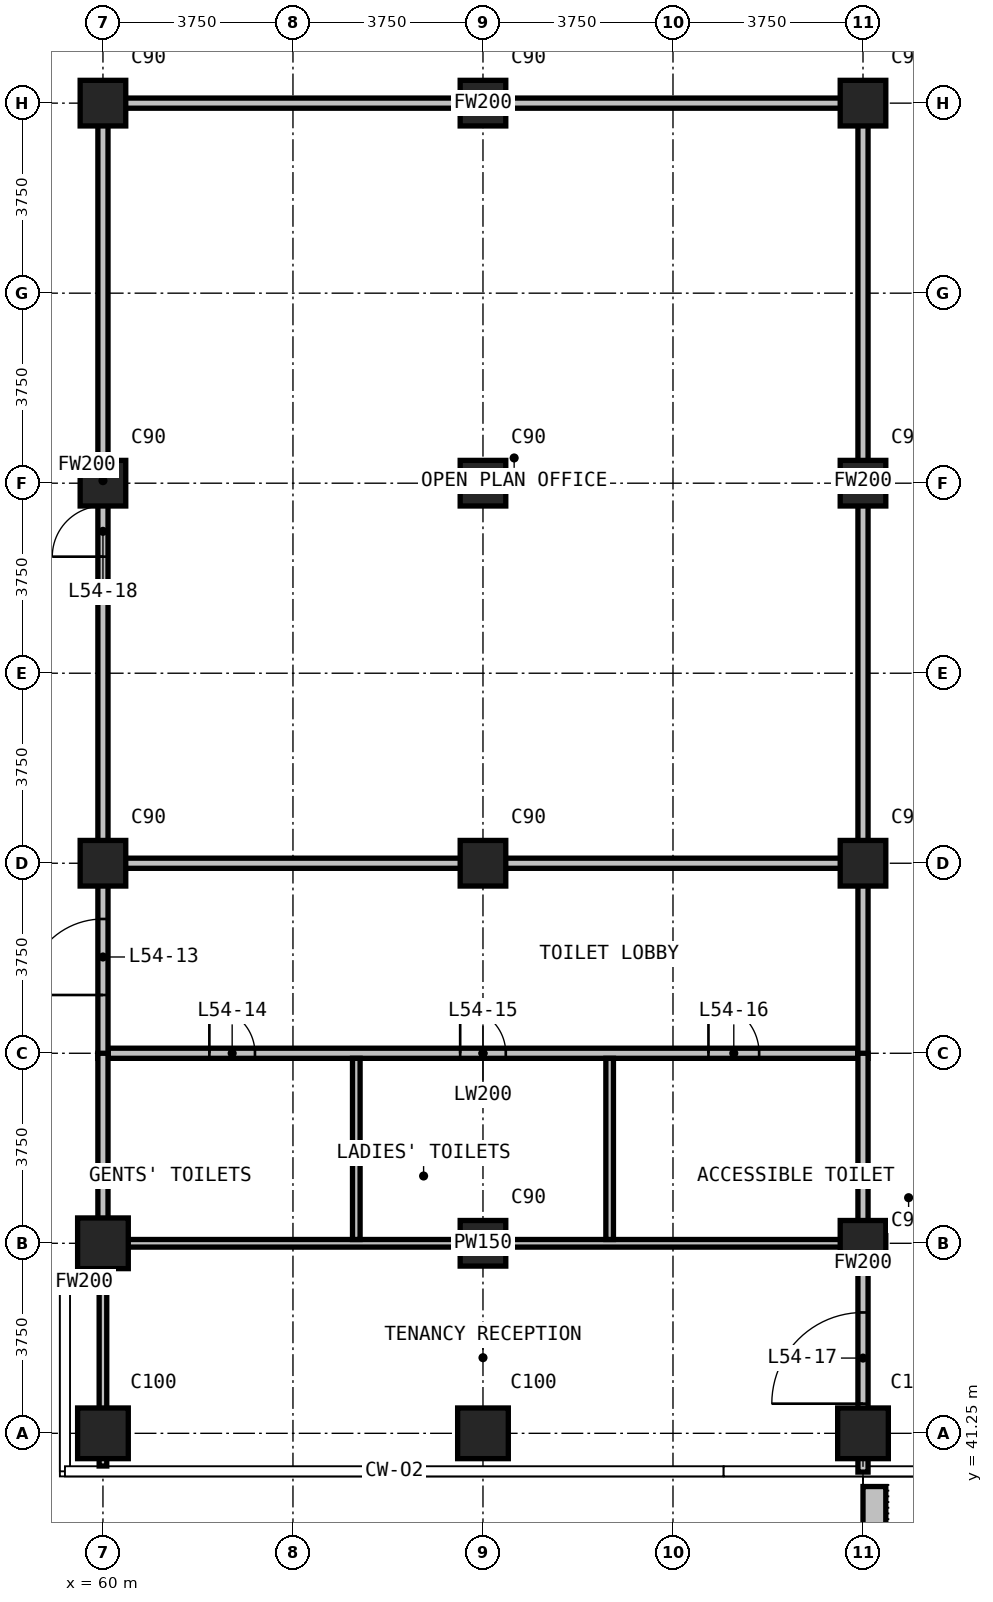
"""IFC4 building model, lengths in metres.
Left out: names, types, materials, properties, quantities, classifications, styles, units other than length and angle.
Written with IfcOpenShell. Run it as: python <this file> out.ifc"""

import sys

from ifc_helpers import new_model, si_unit, direction, frame, frame_2d, origin, origin_2d, place, context, subcontext, project, spatial, rectangle, extrude, element, fill, save


model = new_model("IFC4")
c1 = context("Model", 3, precision=1e-05, world=origin(), true_north=direction((0.0, 1.0)))
c2 = subcontext(c1, "Body", "Model", "MODEL_VIEW")
j1 = project(units=[si_unit("LENGTHUNIT", "METRE"), si_unit("PLANEANGLEUNIT", "RADIAN")], contexts=[c1])
p1 = place(None, origin())
s1 = spatial("IfcSite", under=j1, at=p1, CompositionType="ELEMENT")
p2 = place(p1, origin())
s2 = spatial("IfcBuilding", under=s1, at=p2, CompositionType="ELEMENT")
p3 = place(p2, frame((0.0, 0.0, 210.3)))
s3 = spatial("IfcBuildingStorey", under=s2, at=p3, CompositionType="ELEMENT", Elevation=210.3)
for number, where, z_axis, x_axis in (
    (1, (60.0, 41.25, 0.0), (0.0, 0.0, 1.0), (1.0, 0.0, 0.0)),
    (2, (60.0, 45.0, 0.0), (0.0, 0.0, 1.0), (1.0, 0.0, 0.0)),
):
    element("IfcColumn", number, at=place(p3, frame(where, z_axis=z_axis, x_axis=x_axis)), inside=s3, PredefinedType="COLUMN", context=c2, shape_type="SweptSolid", body=[
        extrude(rectangle(XDim=1.0, YDim=1.0, at=origin_2d()), origin(), (0.0, 0.0, 1.0), 3.6),
    ])
for number, where, z_axis, x_axis in (
    (3, (60.0, 52.5, 0.0), (0.0, 0.0, 1.0), (1.0, 0.0, 0.0)),
    (4, (60.0, 60.0, 0.0), (0.0, 0.0, 1.0), (1.0, 0.0, 0.0)),
    (5, (60.0, 67.5, 0.0), (0.0, 0.0, 1.0), (1.0, 0.0, 0.0)),
):
    element("IfcColumn", number, at=place(p3, frame(where, z_axis=z_axis, x_axis=x_axis)), inside=s3, PredefinedType="COLUMN", context=c2, shape_type="SweptSolid", body=[
        extrude(rectangle(XDim=0.9, YDim=0.9, at=origin_2d()), origin(), (0.0, 0.0, 1.0), 3.6),
    ])
p4 = place(p3, frame((67.5, 41.25, 0.0), z_axis=(0.0, 0.0, 1.0), x_axis=(1.0, 0.0, 0.0)))
e6 = element("IfcColumn", 6, at=p4, inside=s3, PredefinedType="COLUMN", context=c2, shape_type="SweptSolid", body=[
    extrude(rectangle(XDim=1.0, YDim=1.0, at=origin_2d()), origin(), (0.0, 0.0, 1.0), 3.6),
])
for number, where, z_axis, x_axis in (
    (7, (67.5, 45.0, 0.0), (0.0, 0.0, 1.0), (1.0, 0.0, 0.0)),
    (8, (67.5, 52.5, 0.0), (0.0, 0.0, 1.0), (1.0, 0.0, 0.0)),
    (9, (67.5, 60.0, 0.0), (0.0, 0.0, 1.0), (1.0, 0.0, 0.0)),
    (10, (67.5, 67.5, 0.0), (0.0, 0.0, 1.0), (1.0, 0.0, 0.0)),
):
    element("IfcColumn", number, at=place(p3, frame(where, z_axis=z_axis, x_axis=x_axis)), inside=s3, PredefinedType="COLUMN", context=c2, shape_type="SweptSolid", body=[
        extrude(rectangle(XDim=0.9, YDim=0.9, at=origin_2d()), origin(), (0.0, 0.0, 1.0), 3.6),
    ])
p5 = place(p3, frame((75.0, 41.25, 0.0), z_axis=(0.0, 0.0, 1.0), x_axis=(1.0, 0.0, 0.0)))
e11 = element("IfcColumn", 11, at=p5, inside=s3, PredefinedType="COLUMN", context=c2, shape_type="SweptSolid", body=[
    extrude(rectangle(XDim=1.0, YDim=1.0, at=origin_2d()), origin(), (0.0, 0.0, 1.0), 3.6),
])
for number, where, z_axis, x_axis in (
    (12, (75.0, 45.0, 0.0), (0.0, 0.0, 1.0), (1.0, 0.0, 0.0)),
    (13, (75.0, 52.5, 0.0), (0.0, 0.0, 1.0), (1.0, 0.0, 0.0)),
    (14, (75.0, 60.0, 0.0), (0.0, 0.0, 1.0), (1.0, 0.0, 0.0)),
    (15, (75.0, 67.5, 0.0), (0.0, 0.0, 1.0), (1.0, 0.0, 0.0)),
):
    element("IfcColumn", number, at=place(p3, frame(where, z_axis=z_axis, x_axis=x_axis)), inside=s3, PredefinedType="COLUMN", context=c2, shape_type="SweptSolid", body=[
        extrude(rectangle(XDim=0.9, YDim=0.9, at=origin_2d()), origin(), (0.0, 0.0, 1.0), 3.6),
    ])
p6 = place(p3, frame((75.225, 40.2, 0.0), z_axis=(0.0, 0.0, 1.0), x_axis=(0.0, -1.0, 0.0)))
e16 = element("IfcWall", 16, at=p6, inside=s3, PredefinedType="USERDEFINED", context=c2, shape_type="SweptSolid", body=[
    extrude(rectangle(XDim=2.35, YDim=0.45, at=frame_2d((1.175, 0.0))), origin(), (0.0, 0.0, 1.0), 1.1),
])
p7 = place(p3, frame((60.1, 48.75, 0.0), z_axis=(0.0, 0.0, 1.0), x_axis=(1.0, 0.0, 0.0)))
e17 = element("IfcWall", 17, at=p7, inside=s3, PredefinedType="PARTITIONING", context=c2, shape_type="SweptSolid", body=[
    extrude(rectangle(XDim=14.8, YDim=0.2, at=frame_2d((7.4, 0.0))), origin(), (0.0, 0.0, 1.0), 3.3),
])
p8 = place(p7, frame((2.0, 0.0, 0.0)))
e18 = element("IfcOpeningElement", 18, at=p8, cuts=e17, PredefinedType="OPENING", context=c2, shape_type="SweptSolid", body=[
    extrude(rectangle(XDim=0.9, YDim=2.2, at=frame_2d((0.45, 1.1))), frame((0.0, 0.11, 0.0), z_axis=(0.0, -1.0, 0.0), x_axis=(1.0, 0.0, 0.0)), (0.0, 0.0, 1.0), 0.22),
])
p9 = place(p7, frame((6.95, 0.0, 0.0)))
e19 = element("IfcOpeningElement", 19, at=p9, cuts=e17, PredefinedType="OPENING", context=c2, shape_type="SweptSolid", body=[
    extrude(rectangle(XDim=0.9, YDim=2.2, at=frame_2d((0.45, 1.1))), frame((0.0, 0.11, 0.0), z_axis=(0.0, -1.0, 0.0), x_axis=(1.0, 0.0, 0.0)), (0.0, 0.0, 1.0), 0.22),
])
p10 = place(p7, frame((11.85, 0.0, 0.0)))
e20 = element("IfcOpeningElement", 20, at=p10, cuts=e17, PredefinedType="OPENING", context=c2, shape_type="SweptSolid", body=[
    extrude(rectangle(XDim=1.0, YDim=2.2, at=frame_2d((0.5, 1.1))), frame((0.0, 0.11, 0.0), z_axis=(0.0, -1.0, 0.0), x_axis=(1.0, 0.0, 0.0)), (0.0, 0.0, 1.0), 0.22),
])
p11 = place(p3, frame((60.1, 52.5, 0.0), z_axis=(0.0, 0.0, 1.0), x_axis=(1.0, 0.0, 0.0)))
e21 = element("IfcWall", 21, at=p11, inside=s3, PredefinedType="PARTITIONING", context=c2, shape_type="SweptSolid", body=[
    extrude(rectangle(XDim=14.8, YDim=0.2, at=frame_2d((7.4, 0.0))), origin(), (0.0, 0.0, 1.0), 3.3),
])
p12 = place(p3, frame((60.0, 48.65, 0.0), z_axis=(0.0, 0.0, 1.0), x_axis=(0.0, 1.0, 0.0)))
e22 = element("IfcWall", 22, at=p12, inside=s3, PredefinedType="PARTITIONING", context=c2, shape_type="SweptSolid", body=[
    extrude(rectangle(XDim=3.95, YDim=0.2, at=frame_2d((1.975, 0.0))), origin(), (0.0, 0.0, 1.0), 3.3),
])
p13 = place(p12, frame((1.25, 0.0, 0.0)))
e23 = element("IfcOpeningElement", 23, at=p13, cuts=e22, PredefinedType="OPENING", context=c2, shape_type="SweptSolid", body=[
    extrude(rectangle(XDim=1.5, YDim=2.2, at=frame_2d((0.75, 1.1))), frame((0.0, 0.11, 0.0), z_axis=(0.0, -1.0, 0.0), x_axis=(1.0, 0.0, 0.0)), (0.0, 0.0, 1.0), 0.22),
])
p14 = place(p3, frame((75.0, 48.65, 0.0), z_axis=(0.0, 0.0, 1.0), x_axis=(0.0, 1.0, 0.0)))
e24 = element("IfcWall", 24, at=p14, inside=s3, PredefinedType="PARTITIONING", context=c2, shape_type="SweptSolid", body=[
    extrude(rectangle(XDim=3.95, YDim=0.2, at=frame_2d((1.975, 0.0))), origin(), (0.0, 0.0, 1.0), 3.3),
])
p15 = place(p3, frame((59.355, 44.235, 0.0), z_axis=(0.0, 0.0, 1.0), x_axis=(1.0, 0.0, 0.0)))
e25 = element("IfcWall", 25, at=p15, inside=s3, PredefinedType="PARTITIONING", context=c2, shape_type="SweptSolid", body=[
    extrude(rectangle(XDim=0.545, YDim=0.2, at=frame_2d((0.272, 0.0))), origin(), (0.0, 0.0, 1.0), 3.3),
])
p16 = place(p3, frame((60.1, 67.5, 0.0), z_axis=(0.0, 0.0, 1.0), x_axis=(1.0, 0.0, 0.0)))
e26 = element("IfcWall", 26, at=p16, inside=s3, PredefinedType="PARTITIONING", context=c2, shape_type="SweptSolid", body=[
    extrude(rectangle(XDim=14.8, YDim=0.2, at=frame_2d((7.4, 0.0))), origin(), (0.0, 0.0, 1.0), 3.3),
])
p17 = place(p3, frame((60.0, 44.135, 0.0), z_axis=(0.0, 0.0, 1.0), x_axis=(0.0, 1.0, 0.0)))
e27 = element("IfcWall", 27, at=p17, inside=s3, PredefinedType="PARTITIONING", context=c2, shape_type="SweptSolid", body=[
    extrude(rectangle(XDim=4.615, YDim=0.2, at=frame_2d((2.308, 0.0))), origin(), (0.0, 0.0, 1.0), 3.3),
])
p18 = place(p3, frame((60.0, 52.5, 0.0), z_axis=(0.0, 0.0, 1.0), x_axis=(0.0, 1.0, 0.0)))
e28 = element("IfcWall", 28, at=p18, inside=s3, PredefinedType="PARTITIONING", context=c2, shape_type="SweptSolid", body=[
    extrude(rectangle(XDim=15.1, YDim=0.2, at=frame_2d((7.55, 0.0))), origin(), (0.0, 0.0, 1.0), 3.3),
])
p19 = place(p18, frame((6.05, 0.0, 0.0)))
e29 = element("IfcOpeningElement", 29, at=p19, cuts=e28, PredefinedType="OPENING", context=c2, shape_type="SweptSolid", body=[
    extrude(rectangle(XDim=1.0, YDim=2.2, at=frame_2d((0.5, 1.1))), frame((0.0, 0.11, 0.0), z_axis=(0.0, -1.0, 0.0), x_axis=(1.0, 0.0, 0.0)), (0.0, 0.0, 1.0), 0.22),
])
p20 = place(p3, frame((75.0, 40.485, 0.0), z_axis=(0.0, 0.0, 1.0), x_axis=(0.0, 1.0, 0.0)))
e30 = element("IfcWall", 30, at=p20, inside=s3, PredefinedType="PARTITIONING", context=c2, shape_type="SweptSolid", body=[
    extrude(rectangle(XDim=8.265, YDim=0.2, at=frame_2d((4.132, 0.0))), origin(), (0.0, 0.0, 1.0), 3.3),
])
p21 = place(p20, frame((1.35, 0.0, 0.0)))
e31 = element("IfcOpeningElement", 31, at=p21, cuts=e30, PredefinedType="OPENING", context=c2, shape_type="SweptSolid", body=[
    extrude(rectangle(XDim=1.8, YDim=2.2, at=frame_2d((0.9, 1.1))), frame((0.0, 0.11, 0.0), z_axis=(0.0, -1.0, 0.0), x_axis=(1.0, 0.0, 0.0)), (0.0, 0.0, 1.0), 0.22),
])
p22 = place(p3, frame((75.0, 52.5, 0.0), z_axis=(0.0, 0.0, 1.0), x_axis=(0.0, 1.0, 0.0)))
e32 = element("IfcWall", 32, at=p22, inside=s3, PredefinedType="PARTITIONING", context=c2, shape_type="SweptSolid", body=[
    extrude(rectangle(XDim=15.1, YDim=0.2, at=frame_2d((7.55, 0.0))), origin(), (0.0, 0.0, 1.0), 3.3),
])
p23 = place(p3, frame((60.1, 45.0, 0.0), z_axis=(0.0, 0.0, 1.0), x_axis=(1.0, 0.0, 0.0)))
e33 = element("IfcWall", 33, at=p23, inside=s3, PredefinedType="PARTITIONING", context=c2, shape_type="SweptSolid", body=[
    extrude(rectangle(XDim=14.8, YDim=0.15, at=frame_2d((7.4, 0.0))), origin(), (0.0, 0.0, 1.0), 3.3),
])
p24 = place(p3, frame((60.0, 40.605, 0.0), z_axis=(0.0, 0.0, 1.0), x_axis=(0.0, 1.0, 0.0)))
e34 = element("IfcWall", 34, at=p24, inside=s3, PredefinedType="PARTITIONING", context=c2, shape_type="SweptSolid", body=[
    extrude(rectangle(XDim=3.6, YDim=0.15, at=frame_2d((1.8, 0.0))), origin(), (0.0, 0.0, 1.0), 3.3),
])
for number, where, z_axis, x_axis in (
    (35, (65.0, 45.075, 0.0), (0.0, 0.0, 1.0), (0.0, 1.0, 0.0)),
    (36, (70.0, 45.075, 0.0), (0.0, 0.0, 1.0), (0.0, 1.0, 0.0)),
):
    element("IfcWall", number, at=place(p3, frame(where, z_axis=z_axis, x_axis=x_axis)), inside=s3, PredefinedType="PARTITIONING", context=c2, shape_type="SweptSolid", body=[
        extrude(rectangle(XDim=3.575, YDim=0.15, at=frame_2d((1.788, 0.0))), origin(), (0.0, 0.0, 1.0), 3.3),
    ])
p25 = place(p13, origin())
e37 = element("IfcDoor", 37, at=p25, inside=s3, OperationType="DOUBLE_DOOR_SINGLE_SWING", PredefinedType="DOOR", context=c2, shape_type="SweptSolid", body=[
    extrude(rectangle(XDim=1.5, YDim=2.2, at=frame_2d((0.75, 1.1))), frame((0.0, 0.025, 0.0), z_axis=(0.0, -1.0, 0.0), x_axis=(1.0, 0.0, 0.0)), (0.0, 0.0, 1.0), 0.05),
])
fill(e23, e37)
p26 = place(p8, origin())
e38 = element("IfcDoor", 38, at=p26, inside=s3, OperationType="SINGLE_SWING_LEFT", PredefinedType="DOOR", context=c2, shape_type="SweptSolid", body=[
    extrude(rectangle(XDim=0.9, YDim=2.2, at=frame_2d((0.45, 1.1))), frame((0.0, 0.025, 0.0), z_axis=(0.0, -1.0, 0.0), x_axis=(1.0, 0.0, 0.0)), (0.0, 0.0, 1.0), 0.05),
])
fill(e18, e38)
p27 = place(p9, origin())
e39 = element("IfcDoor", 39, at=p27, inside=s3, OperationType="SINGLE_SWING_RIGHT", PredefinedType="DOOR", context=c2, shape_type="SweptSolid", body=[
    extrude(rectangle(XDim=0.9, YDim=2.2, at=frame_2d((0.45, 1.1))), frame((0.0, 0.025, 0.0), z_axis=(0.0, -1.0, 0.0), x_axis=(1.0, 0.0, 0.0)), (0.0, 0.0, 1.0), 0.05),
])
fill(e19, e39)
p28 = place(p10, origin())
e40 = element("IfcDoor", 40, at=p28, inside=s3, OperationType="SINGLE_SWING_RIGHT", PredefinedType="DOOR", context=c2, shape_type="SweptSolid", body=[
    extrude(rectangle(XDim=1.0, YDim=2.2, at=frame_2d((0.5, 1.1))), frame((0.0, 0.025, 0.0), z_axis=(0.0, -1.0, 0.0), x_axis=(1.0, 0.0, 0.0)), (0.0, 0.0, 1.0), 0.05),
])
fill(e20, e40)
p29 = place(p21, origin())
e41 = element("IfcDoor", 41, at=p29, inside=s3, OperationType="DOUBLE_DOOR_SINGLE_SWING", PredefinedType="DOOR", context=c2, shape_type="SweptSolid", body=[
    extrude(rectangle(XDim=1.8, YDim=2.2, at=frame_2d((0.9, 1.1))), frame((0.0, 0.025, 0.0), z_axis=(0.0, -1.0, 0.0), x_axis=(1.0, 0.0, 0.0)), (0.0, 0.0, 1.0), 0.05),
])
fill(e31, e41)
p30 = place(p19, origin())
e42 = element("IfcDoor", 42, at=p30, inside=s3, OperationType="SINGLE_SWING_LEFT", PredefinedType="DOOR", context=c2, shape_type="SweptSolid", body=[
    extrude(rectangle(XDim=1.0, YDim=2.2, at=frame_2d((0.5, 1.1))), frame((0.0, 0.025, 0.0), z_axis=(0.0, -1.0, 0.0), x_axis=(1.0, 0.0, 0.0)), (0.0, 0.0, 1.0), 0.05),
])
fill(e29, e42)
save(model, sys.argv[1])
